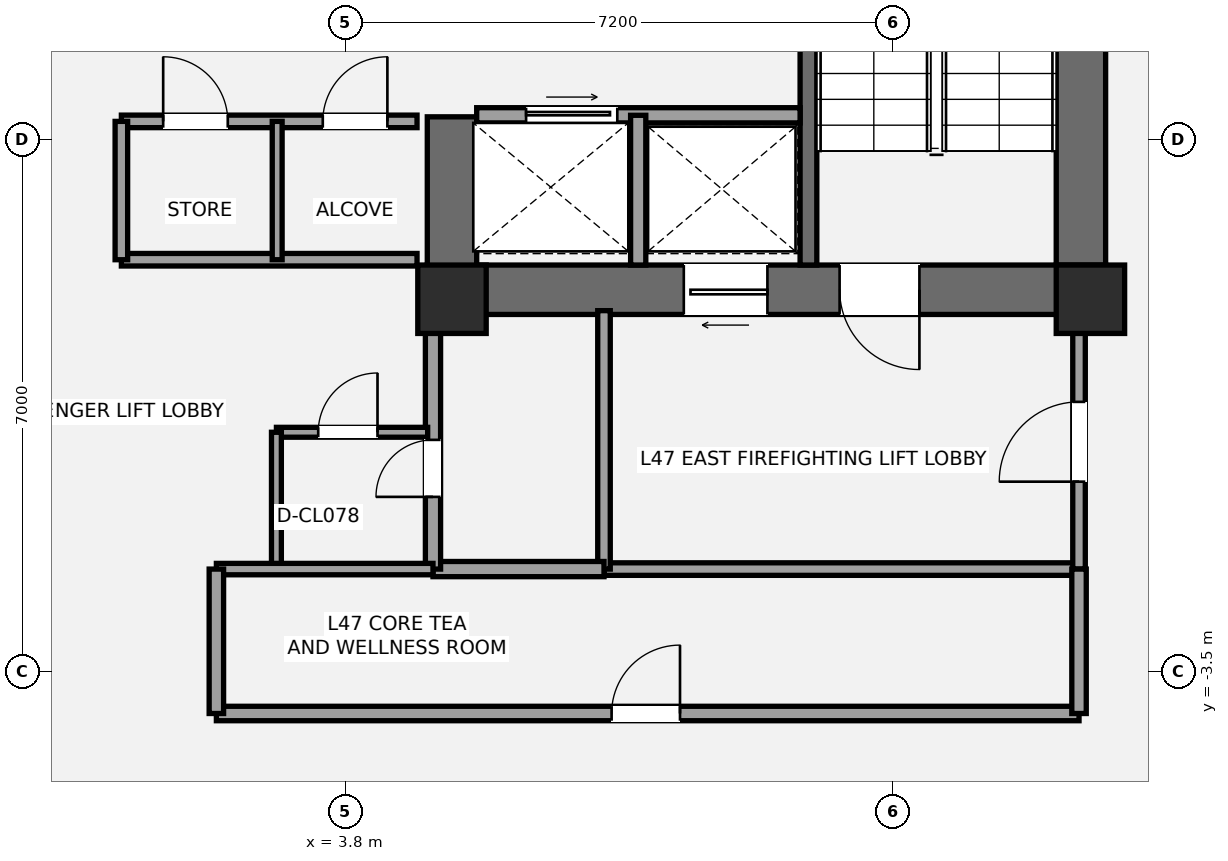
"""IFC4 building model, lengths in metres.
Left out: names, types, materials, properties, quantities, classifications, styles, units other than length and angle.
Written with IfcOpenShell. Run it as: python <this file> out.ifc"""

import sys

from ifc_helpers import new_model, si_unit, direction, frame, frame_2d, origin, origin_2d, place, context, subcontext, project, spatial, rectangle, extrude, element, fill, save


model = new_model("IFC4")
c1 = context("Model", 3, precision=1e-05, world=origin(), true_north=direction((0.0, 1.0)))
c2 = subcontext(c1, "Body", "Model", "MODEL_VIEW")
j1 = project(units=[si_unit("LENGTHUNIT", "METRE"), si_unit("PLANEANGLEUNIT", "RADIAN")], contexts=[c1])
p1 = place(None, origin())
s1 = spatial("IfcSite", under=j1, at=p1, CompositionType="ELEMENT")
p2 = place(p1, origin())
s2 = spatial("IfcBuilding", under=s1, at=p2, CompositionType="ELEMENT")
p3 = place(p2, frame((0.0, 0.0, 172.6)))
s3 = spatial("IfcBuildingStorey", under=s2, at=p3, CompositionType="ELEMENT", Elevation=172.6)
p4 = place(p3, frame((13.475, 1.2, 0.0), z_axis=(0.0, 0.0, 1.0), x_axis=(0.0, 1.0, 0.0)))
e1 = element("IfcWall", 1, at=p4, inside=s3, PredefinedType="SHEAR", context=c2, shape_type="SweptSolid", body=[
    extrude(rectangle(XDim=8.45, YDim=0.65, at=frame_2d((4.225, 0.0))), origin(), (0.0, 0.0, 1.0), 3.2),
])
p5 = place(p3, frame((13.8, 1.525, 0.0), z_axis=(0.0, 0.0, 1.0), x_axis=(-1.0, 0.0, 0.0)))
e2 = element("IfcWall", 2, at=p5, inside=s3, PredefinedType="SHEAR", context=c2, shape_type="SweptSolid", body=[
    extrude(rectangle(XDim=8.925, YDim=0.65, at=frame_2d((4.462, 0.0))), origin(), (0.0, 0.0, 1.0), 3.2),
])
p6 = place(p5, frame((2.45, 0.0, 0.0)))
e3 = element("IfcOpeningElement", 3, at=p6, cuts=e2, PredefinedType="OPENING", context=c2, shape_type="SweptSolid", body=[
    extrude(rectangle(XDim=1.05, YDim=2.15, at=frame_2d((0.525, 1.075))), frame((0.0, 0.335, 0.0), z_axis=(0.0, -1.0, 0.0), x_axis=(1.0, 0.0, 0.0)), (0.0, 0.0, 1.0), 0.67),
])
p7 = place(p5, frame((4.45, 0.0, 0.0)))
e4 = element("IfcOpeningElement", 4, at=p7, cuts=e2, PredefinedType="OPENING", context=c2, shape_type="SweptSolid", body=[
    extrude(rectangle(XDim=1.1, YDim=2.2, at=frame_2d((0.55, 1.1))), frame((0.0, 0.335, 0.0), z_axis=(0.0, -1.0, 0.0), x_axis=(1.0, 0.0, 0.0)), (0.0, 0.0, 1.0), 0.67),
])
p8 = place(p3, frame((5.2, 1.2, 0.0), z_axis=(0.0, 0.0, 1.0), x_axis=(0.0, 1.0, 0.0)))
e5 = element("IfcWall", 5, at=p8, inside=s3, PredefinedType="SHEAR", context=c2, shape_type="SweptSolid", body=[
    extrude(rectangle(XDim=2.6, YDim=0.65, at=frame_2d((1.3, 0.0))), origin(), (0.0, 0.0, 1.0), 3.2),
])
p9 = place(p3, frame((9.89, 1.85, 0.0), z_axis=(0.0, 0.0, 1.0), x_axis=(0.0, 1.0, 0.0)))
e6 = element("IfcWall", 6, at=p9, inside=s3, PredefinedType="SHEAR", context=c2, shape_type="SweptSolid", body=[
    extrude(rectangle(XDim=7.15, YDim=0.22, at=frame_2d((3.575, 0.0))), origin(), (0.0, 0.0, 1.0), 3.2),
])
for number, where, z_axis, x_axis in (
    (7, (5.2, 1.4, 0.0), (0.0, 0.0, 1.0), (1.0, 0.0, 0.0)),
    (8, (13.6, 1.4, 0.0), (0.0, 0.0, 1.0), (1.0, 0.0, 0.0)),
):
    element("IfcColumn", number, at=place(p3, frame(where, z_axis=z_axis, x_axis=x_axis)), inside=s3, PredefinedType="COLUMN", context=c2, shape_type="SweptSolid", body=[
        extrude(rectangle(XDim=0.9, YDim=0.9, at=origin_2d()), origin(), (0.0, 0.0, 1.0), 3.2),
    ])
p10 = place(p3, frame((7.2, -2.15, 0.0), z_axis=(0.0, 0.0, 1.0), x_axis=(1.0, 0.0, 0.0)))
e9 = element("IfcWall", 9, at=p10, inside=s3, PredefinedType="PARTITIONING", context=c2, shape_type="SweptSolid", body=[
    extrude(rectangle(XDim=6.25, YDim=0.165, at=frame_2d((3.125, 0.0))), origin(), (0.0, 0.0, 1.0), 2.473),
])
p11 = place(p3, frame((7.2, -2.15, 0.0), z_axis=(0.0, 0.0, 1.0), x_axis=(0.0, 1.0, 0.0)))
e10 = element("IfcWall", 10, at=p11, inside=s3, PredefinedType="PARTITIONING", context=c2, shape_type="SweptSolid", body=[
    extrude(rectangle(XDim=3.4, YDim=0.165, at=frame_2d((1.7, 0.0))), origin(), (0.0, 0.0, 1.0), 2.473),
])
p12 = place(p3, frame((13.45, -2.15, 0.0), z_axis=(0.0, 0.0, 1.0), x_axis=(0.0, 1.0, 0.0)))
e11 = element("IfcWall", 11, at=p12, inside=s3, PredefinedType="PARTITIONING", context=c2, shape_type="SweptSolid", body=[
    extrude(rectangle(XDim=3.4, YDim=0.165, at=frame_2d((1.7, 0.0))), origin(), (0.0, 0.0, 1.0), 2.473),
])
p13 = place(p12, frame((1.15, 0.0, 0.0)))
e12 = element("IfcOpeningElement", 12, at=p13, cuts=e11, PredefinedType="OPENING", context=c2, shape_type="SweptSolid", body=[
    extrude(rectangle(XDim=1.05, YDim=2.15, at=frame_2d((0.525, 1.075))), frame((0.0, 0.093, 0.0), z_axis=(0.0, -1.0, 0.0), x_axis=(1.0, 0.0, 0.0)), (0.0, 0.0, 1.0), 0.185),
])
p14 = place(p3, frame((4.95, -2.15, 0.0), z_axis=(0.0, 0.0, 1.0), x_axis=(1.0, 0.0, 0.0)))
e13 = element("IfcWall", 13, at=p14, inside=s3, PredefinedType="SOLIDWALL", context=c2, shape_type="SweptSolid", body=[
    extrude(rectangle(XDim=2.25, YDim=0.2, at=frame_2d((1.125, 0.0))), origin(), (0.0, 0.0, 1.0), 3.02),
])
p15 = place(p3, frame((4.95, -2.15, 0.0), z_axis=(0.0, 0.0, 1.0), x_axis=(0.0, 1.0, 0.0)))
e14 = element("IfcWall", 14, at=p15, inside=s3, PredefinedType="SOLIDWALL", context=c2, shape_type="SweptSolid", body=[
    extrude(rectangle(XDim=3.4, YDim=0.2, at=frame_2d((1.7, 0.0))), origin(), (0.0, 0.0, 1.0), 2.473),
])
p16 = place(p15, frame((0.95, 0.0, 0.0)))
e15 = element("IfcOpeningElement", 15, at=p16, cuts=e14, PredefinedType="OPENING", context=c2, shape_type="SweptSolid", body=[
    extrude(rectangle(XDim=0.75, YDim=2.1, at=frame_2d((0.375, 1.05))), frame((0.0, 0.11, 0.0), z_axis=(0.0, -1.0, 0.0), x_axis=(1.0, 0.0, 0.0)), (0.0, 0.0, 1.0), 0.22),
])
p17 = place(p3, frame((2.89, -0.35, 0.0), z_axis=(0.0, 0.0, 1.0), x_axis=(1.0, 0.0, 0.0)))
e16 = element("IfcWall", 16, at=p17, inside=s3, PredefinedType="PARTITIONING", context=c2, shape_type="SweptSolid", body=[
    extrude(rectangle(XDim=1.99, YDim=0.13, at=frame_2d((0.995, 0.0))), origin(), (0.0, 0.0, 1.0), 3.02),
])
p18 = place(p17, frame((0.55, 0.0, 0.0)))
e17 = element("IfcOpeningElement", 17, at=p18, cuts=e16, PredefinedType="OPENING", context=c2, shape_type="SweptSolid", body=[
    extrude(rectangle(XDim=0.78, YDim=2.1, at=frame_2d((0.39, 1.05))), frame((0.0, 0.075, 0.0), z_axis=(0.0, -1.0, 0.0), x_axis=(1.0, 0.0, 0.0)), (0.0, 0.0, 1.0), 0.15),
])
p19 = place(p3, frame((2.89, -2.15, 0.0), z_axis=(0.0, 0.0, 1.0), x_axis=(0.0, 1.0, 0.0)))
e18 = element("IfcWall", 18, at=p19, inside=s3, PredefinedType="PARTITIONING", context=c2, shape_type="SweptSolid", body=[
    extrude(rectangle(XDim=1.8, YDim=0.13, at=frame_2d((0.9, 0.0))), origin(), (0.0, 0.0, 1.0), 3.02),
])
p20 = place(p3, frame((5.525, 3.82, 0.0), z_axis=(0.0, 0.0, 1.0), x_axis=(1.0, 0.0, 0.0)))
e19 = element("IfcWall", 19, at=p20, inside=s3, PredefinedType="SOLIDWALL", context=c2, shape_type="SweptSolid", body=[
    extrude(rectangle(XDim=4.255, YDim=0.2, at=frame_2d((2.127, 0.0))), origin(), (0.0, 0.0, 1.0), 3.02),
])
p21 = place(p20, frame((0.65, 0.0, 0.0)))
e20 = element("IfcOpeningElement", 20, at=p21, cuts=e19, PredefinedType="OPENING", context=c2, shape_type="SweptSolid", body=[
    extrude(rectangle(XDim=1.2, YDim=2.2, at=frame_2d((0.6, 1.1))), frame((0.0, 0.11, 0.0), z_axis=(0.0, -1.0, 0.0), x_axis=(1.0, 0.0, 0.0)), (0.0, 0.0, 1.0), 0.22),
])
p22 = place(p3, frame((7.65, 1.85, 0.0), z_axis=(0.0, 0.0, 1.0), x_axis=(0.0, 1.0, 0.0)))
e21 = element("IfcWall", 21, at=p22, inside=s3, PredefinedType="SOLIDWALL", context=c2, shape_type="SweptSolid", body=[
    extrude(rectangle(XDim=1.97, YDim=0.2, at=frame_2d((0.985, 0.0))), origin(), (0.0, 0.0, 1.0), 3.02),
])
p23 = place(p3, frame((0.85, 1.92, 0.0), z_axis=(0.0, 0.0, 1.0), x_axis=(1.0, 0.0, 0.0)))
e22 = element("IfcWall", 22, at=p23, inside=s3, PredefinedType="PARTITIONING", context=c2, shape_type="SweptSolid", body=[
    extrude(rectangle(XDim=3.89, YDim=0.165, at=frame_2d((1.945, 0.0))), origin(), (0.0, 0.0, 1.0), 2.16),
])
p24 = place(p3, frame((0.85, 3.74, 0.0), z_axis=(0.0, 0.0, 1.0), x_axis=(1.0, 0.0, 0.0)))
e23 = element("IfcWall", 23, at=p24, inside=s3, PredefinedType="PARTITIONING", context=c2, shape_type="SweptSolid", body=[
    extrude(rectangle(XDim=3.89, YDim=0.165, at=frame_2d((1.945, 0.0))), origin(), (0.0, 0.0, 1.0), 3.02),
])
p25 = place(p24, frame((0.55, 0.0, 0.0)))
e24 = element("IfcOpeningElement", 24, at=p25, cuts=e23, PredefinedType="OPENING", context=c2, shape_type="SweptSolid", body=[
    extrude(rectangle(XDim=0.85, YDim=2.1, at=frame_2d((0.425, 1.05))), frame((0.0, 0.093, 0.0), z_axis=(0.0, -1.0, 0.0), x_axis=(1.0, 0.0, 0.0)), (0.0, 0.0, 1.0), 0.185),
])
p26 = place(p24, frame((2.65, 0.0, 0.0)))
e25 = element("IfcOpeningElement", 25, at=p26, cuts=e23, PredefinedType="OPENING", context=c2, shape_type="SweptSolid", body=[
    extrude(rectangle(XDim=0.85, YDim=2.1, at=frame_2d((0.425, 1.05))), frame((0.0, 0.093, 0.0), z_axis=(0.0, -1.0, 0.0), x_axis=(1.0, 0.0, 0.0)), (0.0, 0.0, 1.0), 0.185),
])
p27 = place(p3, frame((0.85, 1.92, 0.0), z_axis=(0.0, 0.0, 1.0), x_axis=(0.0, 1.0, 0.0)))
e26 = element("IfcWall", 26, at=p27, inside=s3, PredefinedType="PARTITIONING", context=c2, shape_type="SweptSolid", body=[
    extrude(rectangle(XDim=1.82, YDim=0.165, at=frame_2d((0.91, 0.0))), origin(), (0.0, 0.0, 1.0), 3.02),
])
p28 = place(p3, frame((2.9, 1.92, 0.0), z_axis=(0.0, 0.0, 1.0), x_axis=(0.0, 1.0, 0.0)))
e27 = element("IfcWall", 27, at=p28, inside=s3, PredefinedType="PARTITIONING", context=c2, shape_type="SweptSolid", body=[
    extrude(rectangle(XDim=1.82, YDim=0.13, at=frame_2d((0.91, 0.0))), origin(), (0.0, 0.0, 1.0), 3.02),
])
p29 = place(p3, frame((2.1, -4.05, 0.0), z_axis=(0.0, 0.0, 1.0), x_axis=(1.0, 0.0, 0.0)))
e28 = element("IfcWall", 28, at=p29, inside=s3, PredefinedType="PLUMBINGWALL", context=c2, shape_type="SweptSolid", body=[
    extrude(rectangle(XDim=11.35, YDim=0.19, at=frame_2d((5.675, 0.0))), origin(), (0.0, 0.0, 1.0), 2.555),
])
p30 = place(p29, frame((5.2, 0.0, 0.0)))
e29 = element("IfcOpeningElement", 29, at=p30, cuts=e28, PredefinedType="OPENING", context=c2, shape_type="SweptSolid", body=[
    extrude(rectangle(XDim=0.9, YDim=2.1, at=frame_2d((0.45, 1.05))), frame((0.0, 0.105, 0.0), z_axis=(0.0, -1.0, 0.0), x_axis=(1.0, 0.0, 0.0)), (0.0, 0.0, 1.0), 0.21),
])
p31 = place(p3, frame((2.1, -2.15, 0.0), z_axis=(0.0, 0.0, 1.0), x_axis=(1.0, 0.0, 0.0)))
e30 = element("IfcWall", 30, at=p31, inside=s3, PredefinedType="PLUMBINGWALL", context=c2, shape_type="SweptSolid", body=[
    extrude(rectangle(XDim=2.85, YDim=0.15, at=frame_2d((1.425, 0.0))), origin(), (0.0, 0.0, 1.0), 3.02),
])
p32 = place(p3, frame((2.1, -4.05, 0.0), z_axis=(0.0, 0.0, 1.0), x_axis=(0.0, 1.0, 0.0)))
e31 = element("IfcWall", 31, at=p32, inside=s3, PredefinedType="PLUMBINGWALL", context=c2, shape_type="SweptSolid", body=[
    extrude(rectangle(XDim=1.9, YDim=0.19, at=frame_2d((0.95, 0.0))), origin(), (0.0, 0.0, 1.0), 3.02),
])
p33 = place(p3, frame((13.45, -4.05, 0.0), z_axis=(0.0, 0.0, 1.0), x_axis=(0.0, 1.0, 0.0)))
e32 = element("IfcWall", 32, at=p33, inside=s3, PredefinedType="PLUMBINGWALL", context=c2, shape_type="SweptSolid", body=[
    extrude(rectangle(XDim=1.9, YDim=0.19, at=frame_2d((0.95, 0.0))), origin(), (0.0, 0.0, 1.0), 2.473),
])
p34 = place(p6, origin())
e33 = element("IfcDoor", 33, at=p34, inside=s3, OperationType="SINGLE_SWING_LEFT", PredefinedType="DOOR", context=c2, shape_type="SweptSolid", body=[
    extrude(rectangle(XDim=1.05, YDim=2.15, at=frame_2d((0.525, 1.075))), frame((0.0, 0.025, 0.0), z_axis=(0.0, -1.0, 0.0), x_axis=(1.0, 0.0, 0.0)), (0.0, 0.0, 1.0), 0.05),
])
fill(e3, e33)
p35 = place(p13, origin())
e34 = element("IfcDoor", 34, at=p35, inside=s3, OperationType="SINGLE_SWING_LEFT", PredefinedType="DOOR", context=c2, shape_type="SweptSolid", body=[
    extrude(rectangle(XDim=1.05, YDim=2.15, at=frame_2d((0.525, 1.075))), frame((0.0, 0.025, 0.0), z_axis=(0.0, -1.0, 0.0), x_axis=(1.0, 0.0, 0.0)), (0.0, 0.0, 1.0), 0.05),
])
fill(e12, e34)
p36 = place(p16, origin())
e35 = element("IfcDoor", 35, at=p36, inside=s3, OperationType="SINGLE_SWING_LEFT", PredefinedType="DOOR", context=c2, shape_type="SweptSolid", body=[
    extrude(rectangle(XDim=0.75, YDim=2.1, at=frame_2d((0.375, 1.05))), frame((0.0, 0.025, 0.0), z_axis=(0.0, -1.0, 0.0), x_axis=(1.0, 0.0, 0.0)), (0.0, 0.0, 1.0), 0.05),
])
fill(e15, e35)
p37 = place(p18, origin())
e36 = element("IfcDoor", 36, at=p37, inside=s3, OperationType="SINGLE_SWING_RIGHT", PredefinedType="DOOR", context=c2, shape_type="SweptSolid", body=[
    extrude(rectangle(XDim=0.78, YDim=2.1, at=frame_2d((0.39, 1.05))), frame((0.0, 0.025, 0.0), z_axis=(0.0, -1.0, 0.0), x_axis=(1.0, 0.0, 0.0)), (0.0, 0.0, 1.0), 0.05),
])
fill(e17, e36)
p38 = place(p7, origin())
e37 = element("IfcDoor", 37, at=p38, inside=s3, OperationType="SLIDING_TO_LEFT", PredefinedType="DOOR", context=c2, shape_type="SweptSolid", body=[
    extrude(rectangle(XDim=1.1, YDim=2.2, at=frame_2d((0.55, 1.1))), frame((0.0, 0.025, 0.0), z_axis=(0.0, -1.0, 0.0), x_axis=(1.0, 0.0, 0.0)), (0.0, 0.0, 1.0), 0.05),
])
fill(e4, e37)
p39 = place(p21, origin())
e38 = element("IfcDoor", 38, at=p39, inside=s3, OperationType="SLIDING_TO_RIGHT", PredefinedType="DOOR", context=c2, shape_type="SweptSolid", body=[
    extrude(rectangle(XDim=1.2, YDim=2.2, at=frame_2d((0.6, 1.1))), frame((0.0, 0.025, 0.0), z_axis=(0.0, -1.0, 0.0), x_axis=(1.0, 0.0, 0.0)), (0.0, 0.0, 1.0), 0.05),
])
fill(e20, e38)
p40 = place(p25, origin())
e39 = element("IfcDoor", 39, at=p40, inside=s3, OperationType="SINGLE_SWING_LEFT", PredefinedType="DOOR", context=c2, shape_type="SweptSolid", body=[
    extrude(rectangle(XDim=0.85, YDim=2.1, at=frame_2d((0.425, 1.05))), frame((0.0, 0.025, 0.0), z_axis=(0.0, -1.0, 0.0), x_axis=(1.0, 0.0, 0.0)), (0.0, 0.0, 1.0), 0.05),
])
fill(e24, e39)
p41 = place(p26, origin())
e40 = element("IfcDoor", 40, at=p41, inside=s3, OperationType="SINGLE_SWING_RIGHT", PredefinedType="DOOR", context=c2, shape_type="SweptSolid", body=[
    extrude(rectangle(XDim=0.85, YDim=2.1, at=frame_2d((0.425, 1.05))), frame((0.0, 0.025, 0.0), z_axis=(0.0, -1.0, 0.0), x_axis=(1.0, 0.0, 0.0)), (0.0, 0.0, 1.0), 0.05),
])
fill(e25, e40)
p42 = place(p30, origin())
e41 = element("IfcDoor", 41, at=p42, inside=s3, OperationType="SINGLE_SWING_RIGHT", PredefinedType="DOOR", context=c2, shape_type="SweptSolid", body=[
    extrude(rectangle(XDim=0.9, YDim=2.1, at=frame_2d((0.45, 1.05))), frame((0.0, 0.025, 0.0), z_axis=(0.0, -1.0, 0.0), x_axis=(1.0, 0.0, 0.0)), (0.0, 0.0, 1.0), 0.05),
])
fill(e29, e41)
save(model, sys.argv[1])
